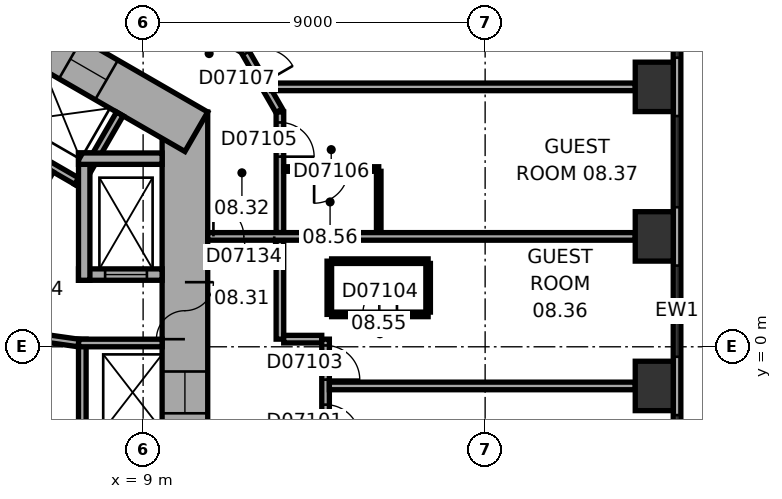
"""IFC4 building model, lengths in metres.
Left out: names, types, materials, properties, quantities, classifications, styles, units other than length and angle.
Written with IfcOpenShell. Run it as: python <this file> out.ifc"""

import sys

from ifc_helpers import new_model, si_unit, direction, frame, frame_2d, origin, origin_2d, place, context, subcontext, project, spatial, rectangle, extrude, element, fill, save


model = new_model("IFC4")
c1 = context("Model", 3, precision=1e-05, world=origin(), true_north=direction((0.0, 1.0)))
c2 = subcontext(c1, "Body", "Model", "MODEL_VIEW")
j1 = project(units=[si_unit("LENGTHUNIT", "METRE"), si_unit("PLANEANGLEUNIT", "RADIAN")], contexts=[c1])
p1 = place(None, origin())
s1 = spatial("IfcSite", under=j1, at=p1, CompositionType="ELEMENT")
p2 = place(p1, origin())
s2 = spatial("IfcBuilding", under=s1, at=p2, CompositionType="ELEMENT")
p3 = place(p2, frame((0.0, 0.0, 47.3)))
s3 = spatial("IfcBuildingStorey", under=s2, at=p3, CompositionType="ELEMENT", Elevation=47.3)
for number, where, z_axis, x_axis in (
    (1, (22.45, -1.03, 0.0), (0.0, 0.0, 1.0), (0.0, 1.0, 0.0)),
    (2, (22.45, 2.905, 0.0), (0.0, 0.0, 1.0), (0.0, 1.0, 0.0)),
    (3, (22.45, 6.839, 0.0), (0.0, 0.0, 1.0), (0.0, 1.0, 0.0)),
):
    element("IfcColumn", number, at=place(p3, frame(where, z_axis=z_axis, x_axis=x_axis)), inside=s3, PredefinedType="COLUMN", context=c2, shape_type="SweptSolid", body=[
        extrude(rectangle(XDim=1.3, YDim=1.0, at=origin_2d()), origin(), (0.0, 0.0, 1.0), 3.3),
    ])
p4 = place(p3, frame((10.1, -6.177, 0.0), z_axis=(0.0, 0.0, 1.0), x_axis=(0.0, 1.0, 0.0)))
e4 = element("IfcWall", 4, at=p4, inside=s3, PredefinedType="SHEAR", context=c2, shape_type="SweptSolid", body=[
    extrude(rectangle(XDim=12.355, YDim=1.2, at=frame_2d((6.177, 0.0))), origin(), (0.0, 0.0, 1.0), 3.3),
])
p5 = place(p4, frame((6.378, 0.0, 0.0)))
e5 = element("IfcOpeningElement", 5, at=p5, cuts=e4, PredefinedType="OPENING", context=c2, shape_type="SweptSolid", body=[
    extrude(rectangle(XDim=1.5, YDim=2.1, at=frame_2d((0.75, 1.05))), frame((0.0, 0.61, 0.0), z_axis=(0.0, -1.0, 0.0), x_axis=(1.0, 0.0, 0.0)), (0.0, 0.0, 1.0), 1.22),
])
p6 = place(p4, frame((1.828, 0.0, 0.0)))
e6 = element("IfcOpeningElement", 6, at=p6, cuts=e4, PredefinedType="OPENING", context=c2, shape_type="SweptSolid", body=[
    extrude(rectangle(XDim=1.1, YDim=2.1, at=frame_2d((0.55, 1.05))), frame((0.0, 0.61, 0.0), z_axis=(0.0, -1.0, 0.0), x_axis=(1.0, 0.0, 0.0)), (0.0, 0.0, 1.0), 1.22),
])
p7 = place(p4, frame((4.427, 0.0, 0.0)))
e7 = element("IfcOpeningElement", 7, at=p7, cuts=e4, PredefinedType="OPENING", context=c2, shape_type="SweptSolid", body=[
    extrude(rectangle(XDim=1.1, YDim=2.1, at=frame_2d((0.55, 1.05))), frame((0.0, 0.61, 0.0), z_axis=(0.0, -1.0, 0.0), x_axis=(1.0, 0.0, 0.0)), (0.0, 0.0, 1.0), 1.22),
])
p8 = place(p3, frame((10.4, 5.658, 0.0), z_axis=(0.0, 0.0, 1.0), x_axis=(-0.866021384402, 0.500006961711, 0.0)))
e8 = element("IfcWall", 8, at=p8, inside=s3, PredefinedType="SHEAR", context=c2, shape_type="SweptSolid", body=[
    extrude(rectangle(XDim=12.355, YDim=1.2, at=frame_2d((6.178, 0.0))), origin(), (0.0, 0.0, 1.0), 3.3),
])
p9 = place(p8, frame((2.728, 0.0, 0.0)))
e9 = element("IfcOpeningElement", 9, at=p9, cuts=e8, PredefinedType="OPENING", context=c2, shape_type="SweptSolid", body=[
    extrude(rectangle(XDim=1.1, YDim=2.1, at=frame_2d((0.55, 1.05))), frame((0.0, 0.61, 0.0), z_axis=(0.0, -1.0, 0.0), x_axis=(1.0, 0.0, 0.0)), (0.0, 0.0, 1.0), 1.22),
])
p10 = place(p8, frame((5.328, 0.0, 0.0)))
e10 = element("IfcOpeningElement", 10, at=p10, cuts=e8, PredefinedType="OPENING", context=c2, shape_type="SweptSolid", body=[
    extrude(rectangle(XDim=1.1, YDim=2.1, at=frame_2d((0.55, 1.05))), frame((0.0, 0.61, 0.0), z_axis=(0.0, -1.0, 0.0), x_axis=(1.0, 0.0, 0.0)), (0.0, 0.0, 1.0), 1.22),
])
p11 = place(p8, frame((7.928, 0.0, 0.0)))
e11 = element("IfcOpeningElement", 11, at=p11, cuts=e8, PredefinedType="OPENING", context=c2, shape_type="SweptSolid", body=[
    extrude(rectangle(XDim=1.1, YDim=2.1, at=frame_2d((0.55, 1.05))), frame((0.0, 0.61, 0.0), z_axis=(0.0, -1.0, 0.0), x_axis=(1.0, 0.0, 0.0)), (0.0, 0.0, 1.0), 1.22),
])
p12 = place(p3, frame((23.05, -9.687, 0.0), z_axis=(0.0, 0.0, 1.0), x_axis=(0.0, 1.0, 0.0)))
e12 = element("IfcWall", 12, at=p12, inside=s3, PredefinedType="STANDARD", context=c2, shape_type="SweptSolid", body=[
    extrude(rectangle(XDim=21.246, YDim=0.2, at=frame_2d((10.623, 0.0))), origin(), (0.0, 0.0, 1.0), 3.3),
])
p13 = place(p12, frame((1.555, 0.0, 0.8)))
e13 = element("IfcOpeningElement", 13, at=p13, cuts=e12, PredefinedType="OPENING", context=c2, shape_type="SweptSolid", body=[
    extrude(rectangle(XDim=2.4, YDim=1.7, at=frame_2d((1.2, 0.85))), frame((0.0, 0.11, 0.0), z_axis=(0.0, -1.0, 0.0), x_axis=(1.0, 0.0, 0.0)), (0.0, 0.0, 1.0), 0.22),
])
p14 = place(p12, frame((5.489, 0.0, 0.8)))
e14 = element("IfcOpeningElement", 14, at=p14, cuts=e12, PredefinedType="OPENING", context=c2, shape_type="SweptSolid", body=[
    extrude(rectangle(XDim=2.4, YDim=1.7, at=frame_2d((1.2, 0.85))), frame((0.0, 0.11, 0.0), z_axis=(0.0, -1.0, 0.0), x_axis=(1.0, 0.0, 0.0)), (0.0, 0.0, 1.0), 0.22),
])
p15 = place(p12, frame((9.424, 0.0, 0.8)))
e15 = element("IfcOpeningElement", 15, at=p15, cuts=e12, PredefinedType="OPENING", context=c2, shape_type="SweptSolid", body=[
    extrude(rectangle(XDim=2.4, YDim=1.7, at=frame_2d((1.2, 0.85))), frame((0.0, 0.11, 0.0), z_axis=(0.0, -1.0, 0.0), x_axis=(1.0, 0.0, 0.0)), (0.0, 0.0, 1.0), 0.22),
])
p16 = place(p12, frame((13.358, 0.0, 0.8)))
e16 = element("IfcOpeningElement", 16, at=p16, cuts=e12, PredefinedType="OPENING", context=c2, shape_type="SweptSolid", body=[
    extrude(rectangle(XDim=2.4, YDim=1.7, at=frame_2d((1.2, 0.85))), frame((0.0, 0.11, 0.0), z_axis=(0.0, -1.0, 0.0), x_axis=(1.0, 0.0, 0.0)), (0.0, 0.0, 1.0), 0.22),
])
p17 = place(p12, frame((17.293, 0.0, 0.8)))
e17 = element("IfcOpeningElement", 17, at=p17, cuts=e12, PredefinedType="OPENING", context=c2, shape_type="SweptSolid", body=[
    extrude(rectangle(XDim=2.4, YDim=1.7, at=frame_2d((1.2, 0.85))), frame((0.0, 0.11, 0.0), z_axis=(0.0, -1.0, 0.0), x_axis=(1.0, 0.0, 0.0)), (0.0, 0.0, 1.0), 0.22),
])
p18 = place(p3, frame((7.4, -5.2, 0.0), z_axis=(0.0, 0.0, 1.0), x_axis=(0.0, 1.0, 0.0)))
e18 = element("IfcWall", 18, at=p18, inside=s3, PredefinedType="PARTITIONING", context=c2, shape_type="SweptSolid", body=[
    extrude(rectangle(XDim=5.4, YDim=0.2, at=frame_2d((2.7, 0.0))), origin(), (0.0, 0.0, 1.0), 3.05),
])
p19 = place(p3, frame((7.3, 0.1, 0.0), z_axis=(0.0, 0.0, 1.0), x_axis=(1.0, 0.0, 0.0)))
e19 = element("IfcWall", 19, at=p19, inside=s3, PredefinedType="PARTITIONING", context=c2, shape_type="SweptSolid", body=[
    extrude(rectangle(XDim=2.2, YDim=0.2, at=frame_2d((1.1, 0.0))), origin(), (0.0, 0.0, 1.0), 3.05),
])
p20 = place(p3, frame((7.424, 4.259, 0.0), z_axis=(0.0, 0.0, 1.0), x_axis=(-0.866026010844, 0.49999894854, 0.0)))
e20 = element("IfcWall", 20, at=p20, inside=s3, PredefinedType="PARTITIONING", context=c2, shape_type="SweptSolid", body=[
    extrude(rectangle(XDim=8.0, YDim=0.2, at=frame_2d((4.0, 0.0))), origin(), (0.0, 0.0, 1.0), 3.05),
])
p21 = place(p3, frame((7.287, 4.222, 0.0), z_axis=(0.0, 0.0, 1.0), x_axis=(0.499946605688, 0.86605622881, 0.0)))
e21 = element("IfcWall", 21, at=p21, inside=s3, PredefinedType="PARTITIONING", context=c2, shape_type="SweptSolid", body=[
    extrude(rectangle(XDim=2.2, YDim=0.2, at=frame_2d((1.1, 0.0))), origin(), (0.0, 0.0, 1.0), 3.05),
])
p22 = place(p3, frame((4.158, 0.602, 0.0), z_axis=(0.0, 0.0, 1.0), x_axis=(0.499977259774, 0.866038532462, 0.0)))
e22 = element("IfcWall", 22, at=p22, inside=s3, PredefinedType="SHEAR", context=c2, shape_type="SweptSolid", body=[
    extrude(rectangle(XDim=4.7, YDim=0.3, at=frame_2d((2.35, 0.0))), origin(), (0.0, 0.0, 1.0), 3.05),
])
p23 = place(p22, frame((0.8, 0.0, 0.0)))
e23 = element("IfcOpeningElement", 23, at=p23, cuts=e22, PredefinedType="OPENING", context=c2, shape_type="SweptSolid", body=[
    extrude(rectangle(XDim=1.2, YDim=2.1, at=frame_2d((0.6, 1.05))), frame((0.0, 0.16, 0.0), z_axis=(0.0, -1.0, 0.0), x_axis=(1.0, 0.0, 0.0)), (0.0, 0.0, 1.0), 0.32),
])
p24 = place(p3, frame((4.816, -0.222, 0.0), z_axis=(0.0, 0.0, 1.0), x_axis=(0.499977259774, -0.866038532462, 0.0)))
e24 = element("IfcWall", 24, at=p24, inside=s3, PredefinedType="SHEAR", context=c2, shape_type="SweptSolid", body=[
    extrude(rectangle(XDim=4.7, YDim=0.3, at=frame_2d((2.35, 0.0))), origin(), (0.0, 0.0, 1.0), 3.05),
])
p25 = place(p3, frame((7.3, 1.9, 0.0), z_axis=(0.0, 0.0, 1.0), x_axis=(1.0, 0.0, 0.0)))
e25 = element("IfcWall", 25, at=p25, inside=s3, PredefinedType="SHEAR", context=c2, shape_type="SweptSolid", body=[
    extrude(rectangle(XDim=2.2, YDim=0.3, at=frame_2d((1.1, 0.0))), origin(), (0.0, 0.0, 1.0), 3.05),
])
p26 = place(p25, frame((0.7, 0.0, 0.0)))
e26 = element("IfcOpeningElement", 26, at=p26, cuts=e25, PredefinedType="OPENING", context=c2, shape_type="SweptSolid", body=[
    extrude(rectangle(XDim=1.1, YDim=2.1, at=frame_2d((0.55, 1.05))), frame((0.0, 0.16, 0.0), z_axis=(0.0, -1.0, 0.0), x_axis=(1.0, 0.0, 0.0)), (0.0, 0.0, 1.0), 0.32),
])
p27 = place(p3, frame((7.45, 1.75, 0.0), z_axis=(0.0, 0.0, 1.0), x_axis=(0.0, 1.0, 0.0)))
e27 = element("IfcWall", 27, at=p27, inside=s3, PredefinedType="SHEAR", context=c2, shape_type="SweptSolid", body=[
    extrude(rectangle(XDim=3.35, YDim=0.3, at=frame_2d((1.675, 0.0))), origin(), (0.0, 0.0, 1.0), 3.05),
])
p28 = place(p3, frame((7.3, 4.95, 0.0), z_axis=(0.0, 0.0, 1.0), x_axis=(1.0, 0.0, 0.0)))
e28 = element("IfcWall", 28, at=p28, inside=s3, PredefinedType="SHEAR", context=c2, shape_type="SweptSolid", body=[
    extrude(rectangle(XDim=2.2, YDim=0.3, at=frame_2d((1.1, 0.0))), origin(), (0.0, 0.0, 1.0), 3.05),
])
p29 = place(p3, frame((4.327, 0.521, 0.0), z_axis=(0.0, 0.0, 1.0), x_axis=(0.990124376366, -0.14019172346, 0.0)))
e29 = element("IfcWall", 29, at=p29, inside=s3, PredefinedType="PARTITIONING", context=c2, shape_type="SweptSolid", body=[
    extrude(rectangle(XDim=3.002, YDim=0.2, at=frame_2d((1.501, 0.0))), origin(), (0.0, 0.0, 1.0), 3.05),
])
p30 = place(p29, frame((1.15, 0.0, 0.0)))
e30 = element("IfcOpeningElement", 30, at=p30, cuts=e29, PredefinedType="OPENING", context=c2, shape_type="SweptSolid", body=[
    extrude(rectangle(XDim=0.9, YDim=2.1, at=frame_2d((0.45, 1.05))), frame((0.0, 0.11, 0.0), z_axis=(0.0, -1.0, 0.0), x_axis=(1.0, 0.0, 0.0)), (0.0, 0.0, 1.0), 0.22),
])
p31 = place(p3, frame((12.58, 6.212, 0.0), z_axis=(0.0, 0.0, 1.0), x_axis=(-0.500063286585, 0.865988862174, 0.0)))
e31 = element("IfcWall", 31, at=p31, inside=s3, PredefinedType="PARTITIONING", context=c2, shape_type="SweptSolid", body=[
    extrude(rectangle(XDim=1.86, YDim=0.2, at=frame_2d((0.93, 0.0))), origin(), (0.0, 0.0, 1.0), 3.05),
])
p32 = place(p31, frame((0.842, 0.0, 0.0)))
e32 = element("IfcOpeningElement", 32, at=p32, cuts=e31, PredefinedType="OPENING", context=c2, shape_type="SweptSolid", body=[
    extrude(rectangle(XDim=0.9, YDim=2.1, at=frame_2d((0.45, 1.05))), frame((0.0, 0.11, 0.0), z_axis=(0.0, -1.0, 0.0), x_axis=(1.0, 0.0, 0.0)), (0.0, 0.0, 1.0), 0.22),
])
p33 = place(p3, frame((12.6, 0.201, 0.0), z_axis=(0.0, 0.0, 1.0), x_axis=(0.0, 1.0, 0.0)))
e33 = element("IfcWall", 33, at=p33, inside=s3, PredefinedType="PARTITIONING", context=c2, shape_type="SweptSolid", body=[
    extrude(rectangle(XDim=2.604, YDim=0.2, at=frame_2d((1.302, 0.0))), origin(), (0.0, 0.0, 1.0), 3.05),
])
p34 = place(p3, frame((12.6, 3.004, 0.0), z_axis=(0.0, 0.0, 1.0), x_axis=(0.0, 1.0, 0.0)))
e34 = element("IfcWall", 34, at=p34, inside=s3, PredefinedType="PARTITIONING", context=c2, shape_type="SweptSolid", body=[
    extrude(rectangle(XDim=3.173, YDim=0.2, at=frame_2d((1.586, 0.0))), origin(), (0.0, 0.0, 1.0), 3.05),
])
p35 = place(p34, frame((1.998, 0.0, 0.0)))
e35 = element("IfcOpeningElement", 35, at=p35, cuts=e34, PredefinedType="OPENING", context=c2, shape_type="SweptSolid", body=[
    extrude(rectangle(XDim=0.9, YDim=2.1, at=frame_2d((0.45, 1.05))), frame((0.0, 0.11, 0.0), z_axis=(0.0, -1.0, 0.0), x_axis=(1.0, 0.0, 0.0)), (0.0, 0.0, 1.0), 0.22),
])
p36 = place(p3, frame((12.7, 4.677, 0.0), z_axis=(0.0, 0.0, 1.0), x_axis=(1.0, 0.0, 0.0)))
e36 = element("IfcWall", 36, at=p36, inside=s3, PredefinedType="PARTITIONING", context=c2, shape_type="SweptSolid", body=[
    extrude(rectangle(XDim=2.5, YDim=0.12, at=frame_2d((1.25, 0.0))), origin(), (0.0, 0.0, 1.0), 3.05),
])
p37 = place(p36, frame((0.8, 0.0, 0.0)))
e37 = element("IfcOpeningElement", 37, at=p37, cuts=e36, PredefinedType="OPENING", context=c2, shape_type="SweptSolid", body=[
    extrude(rectangle(XDim=0.9, YDim=2.1, at=frame_2d((0.45, 1.05))), frame((0.0, 0.07, 0.0), z_axis=(0.0, -1.0, 0.0), x_axis=(1.0, 0.0, 0.0)), (0.0, 0.0, 1.0), 0.14),
])
p38 = place(p3, frame((13.701, 0.201, 0.0), z_axis=(0.0, 0.0, 1.0), x_axis=(-1.0, 0.0, 0.0)))
e38 = element("IfcWall", 38, at=p38, inside=s3, PredefinedType="PARTITIONING", context=c2, shape_type="SweptSolid", body=[
    extrude(rectangle(XDim=1.001, YDim=0.2, at=frame_2d((0.5, 0.0))), origin(), (0.0, 0.0, 1.0), 3.05),
])
p39 = place(p3, frame((13.801, -5.501, 0.0), z_axis=(0.0, 0.0, 1.0), x_axis=(0.0, 1.0, 0.0)))
e39 = element("IfcWall", 39, at=p39, inside=s3, PredefinedType="PARTITIONING", context=c2, shape_type="SweptSolid", body=[
    extrude(rectangle(XDim=5.702, YDim=0.2, at=frame_2d((2.851, 0.0))), origin(), (0.0, 0.0, 1.0), 3.05),
])
p40 = place(p39, frame((3.079, 0.0, 0.0)))
e40 = element("IfcOpeningElement", 40, at=p40, cuts=e39, PredefinedType="OPENING", context=c2, shape_type="SweptSolid", body=[
    extrude(rectangle(XDim=0.9, YDim=2.1, at=frame_2d((0.45, 1.05))), frame((0.0, 0.11, 0.0), z_axis=(0.0, -1.0, 0.0), x_axis=(1.0, 0.0, 0.0)), (0.0, 0.0, 1.0), 0.22),
])
p41 = place(p39, frame((4.636, 0.0, 0.0)))
e41 = element("IfcOpeningElement", 41, at=p41, cuts=e39, PredefinedType="OPENING", context=c2, shape_type="SweptSolid", body=[
    extrude(rectangle(XDim=0.9, YDim=2.1, at=frame_2d((0.45, 1.05))), frame((0.0, 0.11, 0.0), z_axis=(0.0, -1.0, 0.0), x_axis=(1.0, 0.0, 0.0)), (0.0, 0.0, 1.0), 0.22),
])
p42 = place(p3, frame((13.9, 0.853, 0.0), z_axis=(0.0, 0.0, 1.0), x_axis=(0.0, 1.0, 0.0)))
e42 = element("IfcWall", 42, at=p42, inside=s3, PredefinedType="PARTITIONING", context=c2, shape_type="SweptSolid", body=[
    extrude(rectangle(XDim=1.4, YDim=0.12, at=frame_2d((0.7, 0.0))), origin(), (0.0, 0.0, 1.0), 3.05),
])
p43 = place(p3, frame((13.96, 2.253, 0.0), z_axis=(0.0, 0.0, 1.0), x_axis=(1.0, 0.0, 0.0)))
e43 = element("IfcWall", 43, at=p43, inside=s3, PredefinedType="PARTITIONING", context=c2, shape_type="SweptSolid", body=[
    extrude(rectangle(XDim=2.54, YDim=0.12, at=frame_2d((1.27, 0.0))), origin(), (0.0, 0.0, 1.0), 3.05),
])
p44 = place(p3, frame((15.2, 4.618, 0.0), z_axis=(0.0, 0.0, 1.0), x_axis=(0.0, -1.0, 0.0)))
e44 = element("IfcWall", 44, at=p44, inside=s3, PredefinedType="PARTITIONING", context=c2, shape_type="SweptSolid", body=[
    extrude(rectangle(XDim=1.613, YDim=0.12, at=frame_2d((0.807, 0.0))), origin(), (0.0, 0.0, 1.0), 3.05),
])
p45 = place(p3, frame((16.5, 0.853, 0.0), z_axis=(0.0, 0.0, 1.0), x_axis=(-1.0, 0.0, 0.0)))
e45 = element("IfcWall", 45, at=p45, inside=s3, PredefinedType="PARTITIONING", context=c2, shape_type="SweptSolid", body=[
    extrude(rectangle(XDim=2.54, YDim=0.12, at=frame_2d((1.27, 0.0))), origin(), (0.0, 0.0, 1.0), 3.05),
])
p46 = place(p45, frame((0.82, 0.0, 0.0)))
e46 = element("IfcOpeningElement", 46, at=p46, cuts=e45, PredefinedType="OPENING", context=c2, shape_type="SweptSolid", body=[
    extrude(rectangle(XDim=0.9, YDim=2.1, at=frame_2d((0.45, 1.05))), frame((0.0, 0.07, 0.0), z_axis=(0.0, -1.0, 0.0), x_axis=(1.0, 0.0, 0.0)), (0.0, 0.0, 1.0), 0.14),
])
p47 = place(p3, frame((16.5, 2.193, 0.0), z_axis=(0.0, 0.0, 1.0), x_axis=(0.0, -1.0, 0.0)))
e47 = element("IfcWall", 47, at=p47, inside=s3, PredefinedType="PARTITIONING", context=c2, shape_type="SweptSolid", body=[
    extrude(rectangle(XDim=1.28, YDim=0.12, at=frame_2d((0.64, 0.0))), origin(), (0.0, 0.0, 1.0), 3.05),
])
p48 = place(p3, frame((21.95, -1.03, 0.0), z_axis=(0.0, 0.0, 1.0), x_axis=(-1.0, 0.0, 0.0)))
e48 = element("IfcWall", 48, at=p48, inside=s3, PredefinedType="PARTITIONING", context=c2, shape_type="SweptSolid", body=[
    extrude(rectangle(XDim=8.049, YDim=0.2, at=frame_2d((4.024, 0.0))), origin(), (0.0, 0.0, 1.0), 2.6),
])
p49 = place(p3, frame((21.95, 2.905, 0.0), z_axis=(0.0, 0.0, 1.0), x_axis=(-1.0, 0.0, 0.0)))
e49 = element("IfcWall", 49, at=p49, inside=s3, PredefinedType="PARTITIONING", context=c2, shape_type="SweptSolid", body=[
    extrude(rectangle(XDim=11.25, YDim=0.2, at=frame_2d((5.625, 0.0))), origin(), (0.0, 0.0, 1.0), 3.05),
])
p50 = place(p49, frame((9.5, 0.0, 0.0)))
e50 = element("IfcOpeningElement", 50, at=p50, cuts=e49, PredefinedType="OPENING", context=c2, shape_type="SweptSolid", body=[
    extrude(rectangle(XDim=1.6, YDim=2.1, at=frame_2d((0.8, 1.05))), frame((0.0, 0.11, 0.0), z_axis=(0.0, -1.0, 0.0), x_axis=(1.0, 0.0, 0.0)), (0.0, 0.0, 1.0), 0.22),
])
p51 = place(p3, frame((21.95, 6.839, 0.0), z_axis=(0.0, 0.0, 1.0), x_axis=(-1.0, 0.0, 0.0)))
e51 = element("IfcWall", 51, at=p51, inside=s3, PredefinedType="PARTITIONING", context=c2, shape_type="SweptSolid", body=[
    extrude(rectangle(XDim=9.572, YDim=0.2, at=frame_2d((4.786, 0.0))), origin(), (0.0, 0.0, 1.0), 3.05),
])
p52 = place(p14, origin())
e52 = element("IfcWindow", 52, at=p52, inside=s3, PartitioningType="SINGLE_PANEL", PredefinedType="WINDOW", context=c2, shape_type="SweptSolid", body=[
    extrude(rectangle(XDim=2.4, YDim=1.7, at=frame_2d((1.2, 0.85))), frame((0.0, 0.03, 0.0), z_axis=(0.0, -1.0, 0.0), x_axis=(1.0, 0.0, 0.0)), (0.0, 0.0, 1.0), 0.06),
])
fill(e14, e52)
p53 = place(p15, origin())
e53 = element("IfcWindow", 53, at=p53, inside=s3, PartitioningType="SINGLE_PANEL", PredefinedType="WINDOW", context=c2, shape_type="SweptSolid", body=[
    extrude(rectangle(XDim=2.4, YDim=1.7, at=frame_2d((1.2, 0.85))), frame((0.0, 0.03, 0.0), z_axis=(0.0, -1.0, 0.0), x_axis=(1.0, 0.0, 0.0)), (0.0, 0.0, 1.0), 0.06),
])
fill(e15, e53)
p54 = place(p16, origin())
e54 = element("IfcWindow", 54, at=p54, inside=s3, PartitioningType="SINGLE_PANEL", PredefinedType="WINDOW", context=c2, shape_type="SweptSolid", body=[
    extrude(rectangle(XDim=2.4, YDim=1.7, at=frame_2d((1.2, 0.85))), frame((0.0, 0.03, 0.0), z_axis=(0.0, -1.0, 0.0), x_axis=(1.0, 0.0, 0.0)), (0.0, 0.0, 1.0), 0.06),
])
fill(e16, e54)
p55 = place(p17, origin())
e55 = element("IfcWindow", 55, at=p55, inside=s3, PartitioningType="SINGLE_PANEL", PredefinedType="WINDOW", context=c2, shape_type="SweptSolid", body=[
    extrude(rectangle(XDim=2.4, YDim=1.7, at=frame_2d((1.2, 0.85))), frame((0.0, 0.03, 0.0), z_axis=(0.0, -1.0, 0.0), x_axis=(1.0, 0.0, 0.0)), (0.0, 0.0, 1.0), 0.06),
])
fill(e17, e55)
p56 = place(p5, origin())
e56 = element("IfcDoor", 56, at=p56, inside=s3, OperationType="DOUBLE_DOOR_SINGLE_SWING", PredefinedType="DOOR", context=c2, shape_type="SweptSolid", body=[
    extrude(rectangle(XDim=1.5, YDim=2.1, at=frame_2d((0.75, 1.05))), frame((0.0, 0.025, 0.0), z_axis=(0.0, -1.0, 0.0), x_axis=(1.0, 0.0, 0.0)), (0.0, 0.0, 1.0), 0.05),
])
fill(e5, e56)
p57 = place(p26, origin())
e57 = element("IfcDoor", 57, at=p57, inside=s3, OperationType="DOUBLE_DOOR_SLIDING", PredefinedType="DOOR", context=c2, shape_type="SweptSolid", body=[
    extrude(rectangle(XDim=1.1, YDim=2.1, at=frame_2d((0.55, 1.05))), frame((0.0, 0.025, 0.0), z_axis=(0.0, -1.0, 0.0), x_axis=(1.0, 0.0, 0.0)), (0.0, 0.0, 1.0), 0.05),
])
fill(e26, e57)
p58 = place(p7, origin())
e58 = element("IfcDoor", 58, at=p58, inside=s3, OperationType="DOUBLE_DOOR_SLIDING", PredefinedType="DOOR", context=c2, shape_type="SweptSolid", body=[
    extrude(rectangle(XDim=1.1, YDim=2.1, at=frame_2d((0.55, 1.05))), frame((0.0, 0.025, 0.0), z_axis=(0.0, -1.0, 0.0), x_axis=(1.0, 0.0, 0.0)), (0.0, 0.0, 1.0), 0.05),
])
fill(e7, e58)
p59 = place(p9, origin())
e59 = element("IfcDoor", 59, at=p59, inside=s3, OperationType="DOUBLE_DOOR_SLIDING", PredefinedType="DOOR", context=c2, shape_type="SweptSolid", body=[
    extrude(rectangle(XDim=1.1, YDim=2.1, at=frame_2d((0.55, 1.05))), frame((0.0, 0.025, 0.0), z_axis=(0.0, -1.0, 0.0), x_axis=(1.0, 0.0, 0.0)), (0.0, 0.0, 1.0), 0.05),
])
fill(e9, e59)
p60 = place(p40, origin())
e60 = element("IfcDoor", 60, at=p60, inside=s3, OperationType="SINGLE_SWING_LEFT", PredefinedType="DOOR", context=c2, shape_type="SweptSolid", body=[
    extrude(rectangle(XDim=0.9, YDim=2.1, at=frame_2d((0.45, 1.05))), frame((0.0, 0.025, 0.0), z_axis=(0.0, -1.0, 0.0), x_axis=(1.0, 0.0, 0.0)), (0.0, 0.0, 1.0), 0.05),
])
fill(e40, e60)
p61 = place(p41, origin())
e61 = element("IfcDoor", 61, at=p61, inside=s3, OperationType="SINGLE_SWING_LEFT", PredefinedType="DOOR", context=c2, shape_type="SweptSolid", body=[
    extrude(rectangle(XDim=0.9, YDim=2.1, at=frame_2d((0.45, 1.05))), frame((0.0, 0.025, 0.0), z_axis=(0.0, -1.0, 0.0), x_axis=(1.0, 0.0, 0.0)), (0.0, 0.0, 1.0), 0.05),
])
fill(e41, e61)
p62 = place(p46, origin())
e62 = element("IfcDoor", 62, at=p62, inside=s3, OperationType="SINGLE_SWING_LEFT", PredefinedType="DOOR", context=c2, shape_type="SweptSolid", body=[
    extrude(rectangle(XDim=0.9, YDim=2.1, at=frame_2d((0.45, 1.05))), frame((0.0, 0.025, 0.0), z_axis=(0.0, -1.0, 0.0), x_axis=(1.0, 0.0, 0.0)), (0.0, 0.0, 1.0), 0.05),
])
fill(e46, e62)
p63 = place(p35, origin())
e63 = element("IfcDoor", 63, at=p63, inside=s3, OperationType="SINGLE_SWING_LEFT", PredefinedType="DOOR", context=c2, shape_type="SweptSolid", body=[
    extrude(rectangle(XDim=0.9, YDim=2.1, at=frame_2d((0.45, 1.05))), frame((0.0, 0.025, 0.0), z_axis=(0.0, -1.0, 0.0), x_axis=(1.0, 0.0, 0.0)), (0.0, 0.0, 1.0), 0.05),
])
fill(e35, e63)
p64 = place(p37, origin())
e64 = element("IfcDoor", 64, at=p64, inside=s3, OperationType="SINGLE_SWING_LEFT", PredefinedType="DOOR", context=c2, shape_type="SweptSolid", body=[
    extrude(rectangle(XDim=0.9, YDim=2.1, at=frame_2d((0.45, 1.05))), frame((0.0, 0.025, 0.0), z_axis=(0.0, -1.0, 0.0), x_axis=(1.0, 0.0, 0.0)), (0.0, 0.0, 1.0), 0.05),
])
fill(e37, e64)
p65 = place(p32, origin())
e65 = element("IfcDoor", 65, at=p65, inside=s3, OperationType="SINGLE_SWING_LEFT", PredefinedType="DOOR", context=c2, shape_type="SweptSolid", body=[
    extrude(rectangle(XDim=0.9, YDim=2.1, at=frame_2d((0.45, 1.05))), frame((0.0, 0.025, 0.0), z_axis=(0.0, -1.0, 0.0), x_axis=(1.0, 0.0, 0.0)), (0.0, 0.0, 1.0), 0.05),
])
fill(e32, e65)
p66 = place(p50, origin())
e66 = element("IfcDoor", 66, at=p66, inside=s3, OperationType="DOUBLE_DOOR_SINGLE_SWING", PredefinedType="DOOR", context=c2, shape_type="SweptSolid", body=[
    extrude(rectangle(XDim=1.6, YDim=2.1, at=frame_2d((0.8, 1.05))), frame((0.0, 0.025, 0.0), z_axis=(0.0, -1.0, 0.0), x_axis=(1.0, 0.0, 0.0)), (0.0, 0.0, 1.0), 0.05),
])
fill(e50, e66)
save(model, sys.argv[1])
